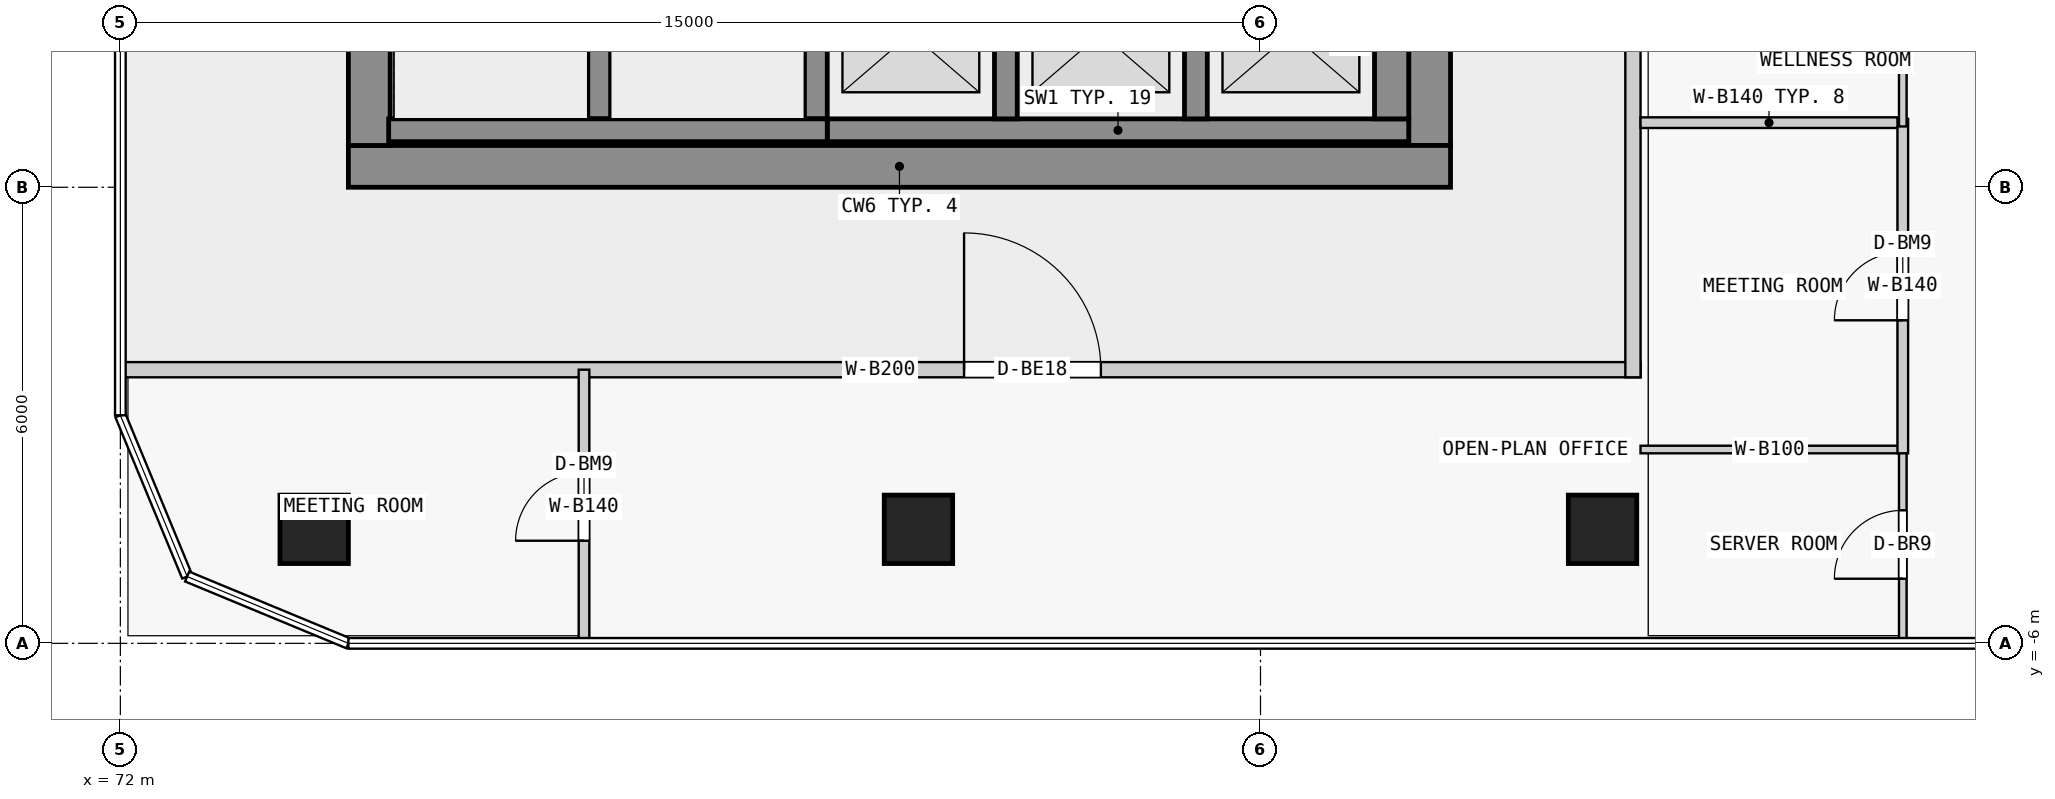
"""IFC4 building model, lengths in metres.
Left out: names, types, materials, properties, quantities, classifications, styles, units other than length and angle.
Written with IfcOpenShell. Run it as: python <this file> out.ifc"""

import sys

from ifc_helpers import new_model, si_unit, direction, frame, frame_2d, origin, origin_2d, place, context, subcontext, project, spatial, rectangle, extrude, element, fill, save


model = new_model("IFC4")
c1 = context("Model", 3, precision=1e-05, world=origin(), true_north=direction((0.0, 1.0)))
c2 = subcontext(c1, "Body", "Model", "MODEL_VIEW")
j1 = project(units=[si_unit("LENGTHUNIT", "METRE"), si_unit("PLANEANGLEUNIT", "RADIAN")], contexts=[c1])
p1 = place(None, origin())
s1 = spatial("IfcSite", under=j1, at=p1, CompositionType="ELEMENT")
p2 = place(p1, origin())
s2 = spatial("IfcBuilding", under=s1, at=p2, CompositionType="ELEMENT")
p3 = place(p2, frame((0.0, 0.0, 37.3)))
s3 = spatial("IfcBuildingStorey", under=s2, at=p3, CompositionType="ELEMENT", Elevation=37.3)
for number, where, z_axis, x_axis in (
    (1, (74.55, -4.5, 0.0), (0.0, 0.0, 1.0), (1.0, 0.0, 0.0)),
    (2, (82.5, -4.5, 0.0), (0.0, 0.0, 1.0), (1.0, 0.0, 0.0)),
    (3, (91.5, -4.5, 0.0), (0.0, 0.0, 1.0), (1.0, 0.0, 0.0)),
):
    element("IfcColumn", number, at=place(p3, frame(where, z_axis=z_axis, x_axis=x_axis)), inside=s3, PredefinedType="COLUMN", context=c2, shape_type="SweptSolid", body=[
        extrude(rectangle(XDim=0.9, YDim=0.9, at=origin_2d()), origin(), (0.0, 0.0, 1.0), 3.5),
    ])
p4 = place(p3, frame((75.0, 0.275, 0.0), z_axis=(0.0, 0.0, 1.0), x_axis=(1.0, 0.0, 0.0)))
e4 = element("IfcWall", 4, at=p4, inside=s3, PredefinedType="SHEAR", context=c2, shape_type="SweptSolid", body=[
    extrude(rectangle(XDim=14.5, YDim=0.55, at=frame_2d((7.25, 0.0))), origin(), (0.0, 0.0, 1.0), 3.25),
])
p5 = place(p3, frame((75.275, 0.55, 0.0), z_axis=(0.0, 0.0, 1.0), x_axis=(0.0, 1.0, 0.0)))
e5 = element("IfcWall", 5, at=p5, inside=s3, PredefinedType="SHEAR", context=c2, shape_type="SweptSolid", body=[
    extrude(rectangle(XDim=16.9, YDim=0.55, at=frame_2d((8.45, 0.0))), origin(), (0.0, 0.0, 1.0), 3.25),
])
p6 = place(p5, frame((7.825, 0.0, 0.0)))
e6 = element("IfcOpeningElement", 6, at=p6, cuts=e5, PredefinedType="OPENING", context=c2, shape_type="SweptSolid", body=[
    extrude(rectangle(XDim=1.8, YDim=2.1, at=frame_2d((0.9, 1.05))), frame((0.0, 0.285, 0.0), z_axis=(0.0, -1.0, 0.0), x_axis=(1.0, 0.0, 0.0)), (0.0, 0.0, 1.0), 0.57),
])
p7 = place(p3, frame((89.225, 0.55, 0.0), z_axis=(0.0, 0.0, 1.0), x_axis=(0.0, 1.0, 0.0)))
e7 = element("IfcWall", 7, at=p7, inside=s3, PredefinedType="SHEAR", context=c2, shape_type="SweptSolid", body=[
    extrude(rectangle(XDim=16.9, YDim=0.55, at=frame_2d((8.45, 0.0))), origin(), (0.0, 0.0, 1.0), 3.25),
])
p8 = place(p7, frame((7.55, 0.0, 0.0)))
e8 = element("IfcOpeningElement", 8, at=p8, cuts=e7, PredefinedType="OPENING", context=c2, shape_type="SweptSolid", body=[
    extrude(rectangle(XDim=1.8, YDim=2.1, at=frame_2d((0.9, 1.05))), frame((0.0, 0.285, 0.0), z_axis=(0.0, -1.0, 0.0), x_axis=(1.0, 0.0, 0.0)), (0.0, 0.0, 1.0), 0.57),
])
p9 = place(p3, frame((75.53, 0.75, 0.0), z_axis=(0.0, 0.0, 1.0), x_axis=(1.0, 0.0, 0.0)))
e9 = element("IfcWall", 9, at=p9, inside=s3, PredefinedType="SHEAR", context=c2, shape_type="SweptSolid", body=[
    extrude(rectangle(XDim=5.77, YDim=0.3, at=frame_2d((2.885, 0.0))), origin(), (0.0, 0.0, 1.0), 3.25),
])
for number, where, z_axis, x_axis in (
    (10, (78.3, 0.9, 0.0), (0.0, 0.0, 1.0), (0.0, 1.0, 0.0)),
    (11, (81.15, 0.9, 0.0), (0.0, 0.0, 1.0), (0.0, 1.0, 0.0)),
):
    element("IfcWall", number, at=place(p3, frame(where, z_axis=z_axis, x_axis=x_axis)), inside=s3, PredefinedType="SHEAR", context=c2, shape_type="SweptSolid", body=[
        extrude(rectangle(XDim=6.4, YDim=0.3, at=frame_2d((3.2, 0.0))), origin(), (0.0, 0.0, 1.0), 3.25),
    ])
p10 = place(p3, frame((81.3, 0.75, 0.0), z_axis=(0.0, 0.0, 1.0), x_axis=(1.0, 0.0, 0.0)))
e12 = element("IfcWall", 12, at=p10, inside=s3, PredefinedType="SHEAR", context=c2, shape_type="SweptSolid", body=[
    extrude(rectangle(XDim=7.65, YDim=0.3, at=frame_2d((3.825, 0.0))), origin(), (0.0, 0.0, 1.0), 3.25),
])
for number, where, z_axis, x_axis in (
    (13, (83.65, 0.9, 0.0), (0.0, 0.0, 1.0), (0.0, 1.0, 0.0)),
    (14, (86.15, 0.9, 0.0), (0.0, 0.0, 1.0), (0.0, 1.0, 0.0)),
):
    element("IfcWall", number, at=place(p3, frame(where, z_axis=z_axis, x_axis=x_axis)), inside=s3, PredefinedType="SHEAR", context=c2, shape_type="SweptSolid", body=[
        extrude(rectangle(XDim=2.0, YDim=0.3, at=frame_2d((1.0, 0.0))), origin(), (0.0, 0.0, 1.0), 3.25),
    ])
p11 = place(p3, frame((88.725, 0.9, 0.0), z_axis=(0.0, 0.0, 1.0), x_axis=(0.0, 1.0, 0.0)))
e15 = element("IfcWall", 15, at=p11, inside=s3, PredefinedType="SHEAR", context=c2, shape_type="SweptSolid", body=[
    extrude(rectangle(XDim=2.0, YDim=0.45, at=frame_2d((1.0, 0.0))), origin(), (0.0, 0.0, 1.0), 3.25),
])
p12 = place(p3, frame((72.0, -2.4, 0.0), z_axis=(0.0, 0.0, 1.0), x_axis=(1.0, 0.0, 0.0)))
e16 = element("IfcWall", 16, at=p12, inside=s3, PredefinedType="PARTITIONING", context=c2, shape_type="SweptSolid", body=[
    extrude(rectangle(XDim=20.0, YDim=0.2, at=frame_2d((10.0, 0.0))), origin(), (0.0, 0.0, 1.0), 3.25),
])
p13 = place(p12, frame((11.1, 0.0, 0.0)))
e17 = element("IfcOpeningElement", 17, at=p13, cuts=e16, PredefinedType="OPENING", context=c2, shape_type="SweptSolid", body=[
    extrude(rectangle(XDim=1.8, YDim=2.1, at=frame_2d((0.9, 1.05))), frame((0.0, 0.11, 0.0), z_axis=(0.0, -1.0, 0.0), x_axis=(1.0, 0.0, 0.0)), (0.0, 0.0, 1.0), 0.22),
])
p14 = place(p3, frame((91.9, -2.5, 0.0), z_axis=(0.0, 0.0, 1.0), x_axis=(0.0, 1.0, 0.0)))
e18 = element("IfcWall", 18, at=p14, inside=s3, PredefinedType="PARTITIONING", context=c2, shape_type="SweptSolid", body=[
    extrude(rectangle(XDim=12.1, YDim=0.2, at=frame_2d((6.05, 0.0))), origin(), (0.0, 0.0, 1.0), 3.25),
])
p15 = place(p3, frame((78.1, -6.0, 0.0), z_axis=(0.0, 0.0, 1.0), x_axis=(0.0, 1.0, 0.0)))
e19 = element("IfcWall", 19, at=p15, inside=s3, PredefinedType="PARTITIONING", context=c2, shape_type="SweptSolid", body=[
    extrude(rectangle(XDim=3.6, YDim=0.14, at=frame_2d((1.8, 0.0))), origin(), (0.0, 0.0, 1.0), 3.25),
])
p16 = place(p15, frame((1.35, 0.0, 0.0)))
e20 = element("IfcOpeningElement", 20, at=p16, cuts=e19, PredefinedType="OPENING", context=c2, shape_type="SweptSolid", body=[
    extrude(rectangle(XDim=0.9, YDim=2.4, at=frame_2d((0.45, 1.2))), frame((0.0, 0.08, 0.0), z_axis=(0.0, -1.0, 0.0), x_axis=(1.0, 0.0, 0.0)), (0.0, 0.0, 1.0), 0.16),
])
p17 = place(p3, frame((95.45, -6.0, 0.0), z_axis=(0.0, 0.0, 1.0), x_axis=(0.0, 1.0, 0.0)))
e21 = element("IfcWall", 21, at=p17, inside=s3, PredefinedType="PARTITIONING", context=c2, shape_type="SweptSolid", body=[
    extrude(rectangle(XDim=2.6, YDim=0.1, at=frame_2d((1.3, 0.0))), origin(), (0.0, 0.0, 1.0), 3.25),
])
p18 = place(p17, frame((0.85, 0.0, 0.0)))
e22 = element("IfcOpeningElement", 22, at=p18, cuts=e21, PredefinedType="OPENING", context=c2, shape_type="SweptSolid", body=[
    extrude(rectangle(XDim=0.9, YDim=2.1, at=frame_2d((0.45, 1.05))), frame((0.0, 0.06, 0.0), z_axis=(0.0, -1.0, 0.0), x_axis=(1.0, 0.0, 0.0)), (0.0, 0.0, 1.0), 0.12),
])
p19 = place(p3, frame((92.0, -3.45, 0.0), z_axis=(0.0, 0.0, 1.0), x_axis=(1.0, 0.0, 0.0)))
e23 = element("IfcWall", 23, at=p19, inside=s3, PredefinedType="PARTITIONING", context=c2, shape_type="SweptSolid", body=[
    extrude(rectangle(XDim=3.4, YDim=0.1, at=frame_2d((1.7, 0.0))), origin(), (0.0, 0.0, 1.0), 3.25),
])
p20 = place(p3, frame((95.45, -3.5, 0.0), z_axis=(0.0, 0.0, 1.0), x_axis=(0.0, 1.0, 0.0)))
e24 = element("IfcWall", 24, at=p20, inside=s3, PredefinedType="PARTITIONING", context=c2, shape_type="SweptSolid", body=[
    extrude(rectangle(XDim=4.4, YDim=0.14, at=frame_2d((2.2, 0.0))), origin(), (0.0, 0.0, 1.0), 3.25),
])
p21 = place(p20, frame((1.75, 0.0, 0.0)))
e25 = element("IfcOpeningElement", 25, at=p21, cuts=e24, PredefinedType="OPENING", context=c2, shape_type="SweptSolid", body=[
    extrude(rectangle(XDim=0.9, YDim=2.4, at=frame_2d((0.45, 1.2))), frame((0.0, 0.08, 0.0), z_axis=(0.0, -1.0, 0.0), x_axis=(1.0, 0.0, 0.0)), (0.0, 0.0, 1.0), 0.16),
])
p22 = place(p3, frame((92.0, 0.85, 0.0), z_axis=(0.0, 0.0, 1.0), x_axis=(1.0, 0.0, 0.0)))
e26 = element("IfcWall", 26, at=p22, inside=s3, PredefinedType="PARTITIONING", context=c2, shape_type="SweptSolid", body=[
    extrude(rectangle(XDim=3.38, YDim=0.14, at=frame_2d((1.69, 0.0))), origin(), (0.0, 0.0, 1.0), 3.25),
])
p23 = place(p3, frame((95.45, 0.8, 0.0), z_axis=(0.0, 0.0, 1.0), x_axis=(0.0, 1.0, 0.0)))
e27 = element("IfcWall", 27, at=p23, inside=s3, PredefinedType="PARTITIONING", context=c2, shape_type="SweptSolid", body=[
    extrude(rectangle(XDim=3.2, YDim=0.1, at=frame_2d((1.6, 0.0))), origin(), (0.0, 0.0, 1.0), 3.25),
])
p24 = place(p23, frame((1.15, 0.0, 0.0)))
e28 = element("IfcOpeningElement", 28, at=p24, cuts=e27, PredefinedType="OPENING", context=c2, shape_type="SweptSolid", body=[
    extrude(rectangle(XDim=0.9, YDim=2.1, at=frame_2d((0.45, 1.05))), frame((0.0, 0.06, 0.0), z_axis=(0.0, -1.0, 0.0), x_axis=(1.0, 0.0, 0.0)), (0.0, 0.0, 1.0), 0.12),
])
p25 = place(p13, origin())
e29 = element("IfcDoor", 29, at=p25, inside=s3, OperationType="DOUBLE_DOOR_SINGLE_SWING", PredefinedType="DOOR", context=c2, shape_type="SweptSolid", body=[
    extrude(rectangle(XDim=1.8, YDim=2.1, at=frame_2d((0.9, 1.05))), frame((0.0, 0.025, 0.0), z_axis=(0.0, -1.0, 0.0), x_axis=(1.0, 0.0, 0.0)), (0.0, 0.0, 1.0), 0.05),
])
fill(e17, e29)
p26 = place(p16, origin())
e30 = element("IfcDoor", 30, at=p26, inside=s3, OperationType="SINGLE_SWING_LEFT", PredefinedType="DOOR", context=c2, shape_type="SweptSolid", body=[
    extrude(rectangle(XDim=0.9, YDim=2.4, at=frame_2d((0.45, 1.2))), frame((0.0, 0.025, 0.0), z_axis=(0.0, -1.0, 0.0), x_axis=(1.0, 0.0, 0.0)), (0.0, 0.0, 1.0), 0.05),
])
fill(e20, e30)
p27 = place(p18, origin())
e31 = element("IfcDoor", 31, at=p27, inside=s3, OperationType="SINGLE_SWING_LEFT", PredefinedType="DOOR", context=c2, shape_type="SweptSolid", body=[
    extrude(rectangle(XDim=0.9, YDim=2.1, at=frame_2d((0.45, 1.05))), frame((0.0, 0.025, 0.0), z_axis=(0.0, -1.0, 0.0), x_axis=(1.0, 0.0, 0.0)), (0.0, 0.0, 1.0), 0.05),
])
fill(e22, e31)
p28 = place(p21, origin())
e32 = element("IfcDoor", 32, at=p28, inside=s3, OperationType="SINGLE_SWING_LEFT", PredefinedType="DOOR", context=c2, shape_type="SweptSolid", body=[
    extrude(rectangle(XDim=0.9, YDim=2.4, at=frame_2d((0.45, 1.2))), frame((0.0, 0.025, 0.0), z_axis=(0.0, -1.0, 0.0), x_axis=(1.0, 0.0, 0.0)), (0.0, 0.0, 1.0), 0.05),
])
fill(e25, e32)
save(model, sys.argv[1])
